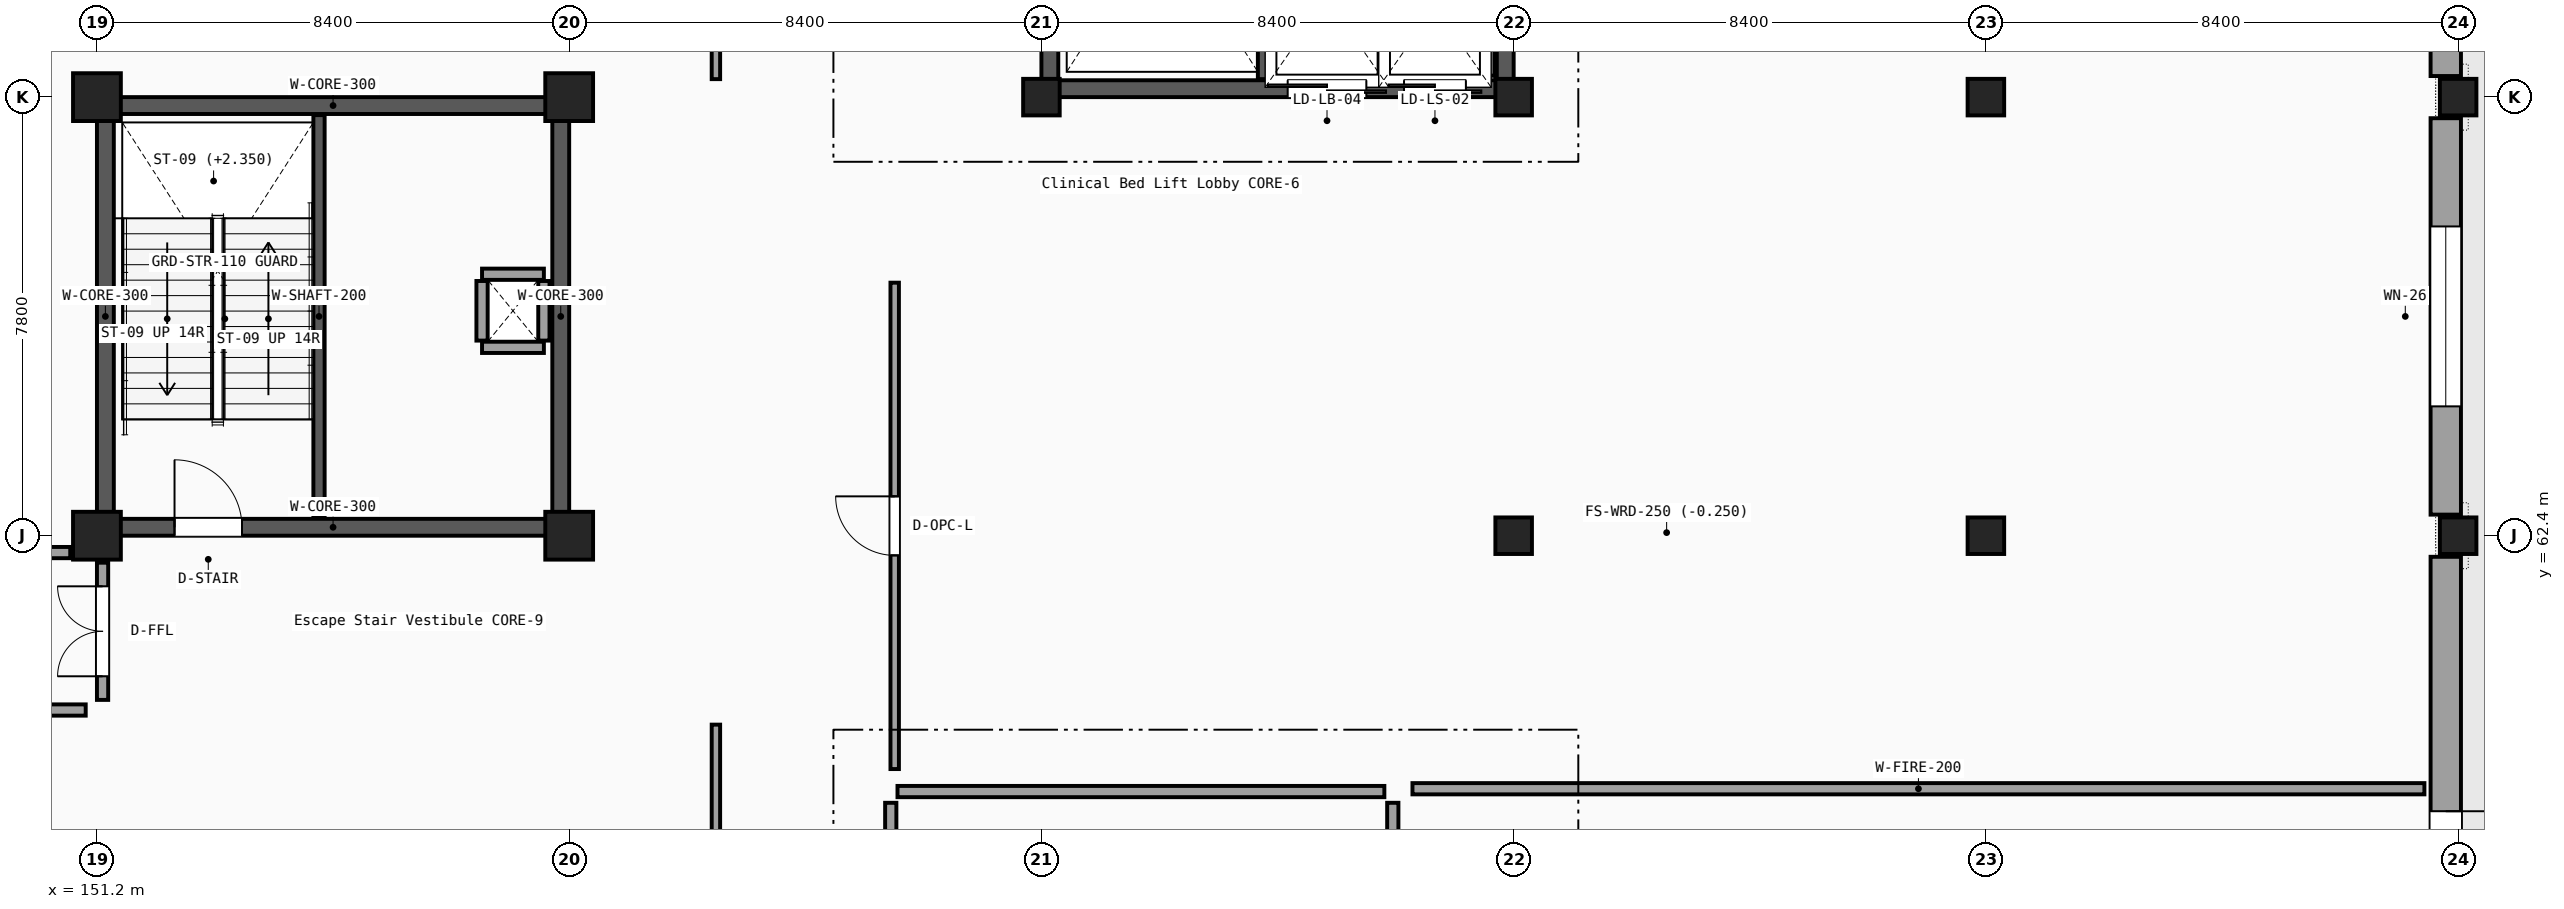
"""IFC4 building model, lengths in metres.
Left out: names, types, materials, properties, quantities, classifications, styles, units other than length and angle.
Written with IfcOpenShell. Run it as: python <this file> out.ifc"""

import sys

from ifc_helpers import new_model, si_unit, direction, frame, frame_2d, origin, origin_2d, place, context, subcontext, project, spatial, rectangle, i_section, extrude, element, fill, save


model = new_model("IFC4")
c1 = context("Model", 3, precision=1e-05, world=origin(), true_north=direction((0.0, 1.0)))
c2 = subcontext(c1, "Body", "Model", "MODEL_VIEW")
j1 = project(units=[si_unit("LENGTHUNIT", "METRE"), si_unit("PLANEANGLEUNIT", "RADIAN")], contexts=[c1])
p1 = place(None, origin())
s1 = spatial("IfcSite", under=j1, at=p1, CompositionType="ELEMENT")
p2 = place(p1, origin())
s2 = spatial("IfcBuilding", under=s1, at=p2, CompositionType="ELEMENT")
p3 = place(p2, origin())
s3 = spatial("IfcBuildingStorey", under=s2, at=p3, CompositionType="ELEMENT", Elevation=0.0)
for number, where, z_axis, x_axis in (
    (1, (151.2, 62.4, 0.0), (0.0, 0.0, 1.0), (1.0, 0.0, 0.0)),
    (2, (151.2, 70.2, 0.0), (0.0, 0.0, 1.0), (1.0, 0.0, 0.0)),
    (3, (159.6, 62.4, 0.0), (0.0, 0.0, 1.0), (1.0, 0.0, 0.0)),
    (4, (159.6, 70.2, 0.0), (0.0, 0.0, 1.0), (1.0, 0.0, 0.0)),
):
    element("IfcColumn", number, at=place(p3, frame(where, z_axis=z_axis, x_axis=x_axis)), inside=s3, PredefinedType="COLUMN", context=c2, shape_type="SweptSolid", body=[
        extrude(rectangle(XDim=0.85, YDim=0.85, at=origin_2d()), origin(), (0.0, 0.0, 1.0), 5.1),
    ])
for number, where, z_axis, x_axis in (
    (5, (168.0, 70.2, 0.0), (0.0, 0.0, 1.0), (1.0, 0.0, 0.0)),
    (6, (176.4, 62.4, 0.0), (0.0, 0.0, 1.0), (1.0, 0.0, 0.0)),
    (7, (176.4, 70.2, 0.0), (0.0, 0.0, 1.0), (1.0, 0.0, 0.0)),
    (8, (184.8, 62.4, 0.0), (0.0, 0.0, 1.0), (1.0, 0.0, 0.0)),
    (9, (184.8, 70.2, 0.0), (0.0, 0.0, 1.0), (1.0, 0.0, 0.0)),
    (10, (193.2, 62.4, 0.0), (0.0, 0.0, 1.0), (1.0, 0.0, 0.0)),
    (11, (193.2, 70.2, 0.0), (0.0, 0.0, 1.0), (1.0, 0.0, 0.0)),
):
    element("IfcColumn", number, at=place(p3, frame(where, z_axis=z_axis, x_axis=x_axis)), inside=s3, PredefinedType="COLUMN", context=c2, shape_type="SweptSolid", body=[
        extrude(i_section(OverallWidth=0.3, OverallDepth=0.65, WebThickness=0.016, FlangeThickness=0.031, FilletRadius=0.027, at=origin_2d()), origin(), (0.0, 0.0, 1.0), 5.1),
    ])
p4 = place(p3, frame((192.98, 54.975, 0.0), z_axis=(0.0, 0.0, 1.0), x_axis=(0.0, 1.0, 0.0)))
e12 = element("IfcWall", 12, at=p4, inside=s3, PredefinedType="SOLIDWALL", context=c2, shape_type="SweptSolid", body=[
    extrude(rectangle(XDim=7.05, YDim=0.54, at=frame_2d((3.525, 0.0))), origin(), (0.0, 0.0, 1.0), 4.33),
])
p5 = place(p4, frame((0.525, 0.0, 0.0)))
e13 = element("IfcOpeningElement", 13, at=p5, cuts=e12, PredefinedType="OPENING", context=c2, shape_type="SweptSolid", body=[
    extrude(rectangle(XDim=2.0, YDim=2.25, at=frame_2d((1.0, 1.125))), frame((0.0, 0.28, 0.0), z_axis=(0.0, -1.0, 0.0), x_axis=(1.0, 0.0, 0.0)), (0.0, 0.0, 1.0), 0.56),
])
p6 = place(p3, frame((192.98, 62.775, 0.0), z_axis=(0.0, 0.0, 1.0), x_axis=(0.0, 1.0, 0.0)))
e14 = element("IfcWall", 14, at=p6, inside=s3, PredefinedType="SOLIDWALL", context=c2, shape_type="SweptSolid", body=[
    extrude(rectangle(XDim=7.05, YDim=0.54, at=frame_2d((3.525, 0.0))), origin(), (0.0, 0.0, 1.0), 4.33),
])
p7 = place(p6, frame((1.925, 0.0, 0.75)))
e15 = element("IfcOpeningElement", 15, at=p7, cuts=e14, PredefinedType="OPENING", context=c2, shape_type="SweptSolid", body=[
    extrude(rectangle(XDim=3.2, YDim=1.8, at=frame_2d((1.6, 0.9))), frame((0.0, 0.28, 0.0), z_axis=(0.0, -1.0, 0.0), x_axis=(1.0, 0.0, 0.0)), (0.0, 0.0, 1.0), 0.56),
])
p8 = place(p3, frame((192.98, 70.575, 0.0), z_axis=(0.0, 0.0, 1.0), x_axis=(0.0, 1.0, 0.0)))
e16 = element("IfcWall", 16, at=p8, inside=s3, PredefinedType="SOLIDWALL", context=c2, shape_type="SweptSolid", body=[
    extrude(rectangle(XDim=7.05, YDim=0.54, at=frame_2d((3.525, 0.0))), origin(), (0.0, 0.0, 1.0), 4.33),
])
p9 = place(p8, frame((2.425, 0.0, 0.0)))
e17 = element("IfcOpeningElement", 17, at=p9, cuts=e16, PredefinedType="OPENING", context=c2, shape_type="SweptSolid", body=[
    extrude(rectangle(XDim=2.2, YDim=2.3, at=frame_2d((1.1, 1.15))), frame((0.0, 0.28, 0.0), z_axis=(0.0, -1.0, 0.0), x_axis=(1.0, 0.0, 0.0)), (0.0, 0.0, 1.0), 0.56),
])
p10 = place(p3, frame((165.44, 57.85, 0.0), z_axis=(0.0, 0.0, 1.0), x_axis=(1.0, 0.0, 0.0)))
e18 = element("IfcWall", 18, at=p10, inside=s3, PredefinedType="PARTITIONING", context=c2, shape_type="SweptSolid", body=[
    extrude(rectangle(XDim=8.66, YDim=0.2, at=frame_2d((4.33, 0.0))), origin(), (0.0, 0.0, 1.0), 4.33),
])
p11 = place(p3, frame((165.32, 55.0, 0.0), z_axis=(0.0, 0.0, 1.0), x_axis=(0.0, 1.0, 0.0)))
e19 = element("IfcWall", 19, at=p11, inside=s3, PredefinedType="PARTITIONING", context=c2, shape_type="SweptSolid", body=[
    extrude(rectangle(XDim=2.65, YDim=0.2, at=frame_2d((1.325, 0.0))), origin(), (0.0, 0.0, 1.0), 4.33),
])
p12 = place(p11, frame((0.525, 0.0, 0.0)))
e20 = element("IfcOpeningElement", 20, at=p12, cuts=e19, PredefinedType="OPENING", context=c2, shape_type="SweptSolid", body=[
    extrude(rectangle(XDim=1.6, YDim=2.2, at=frame_2d((0.8, 1.1))), frame((0.0, 0.11, 0.0), z_axis=(0.0, -1.0, 0.0), x_axis=(1.0, 0.0, 0.0)), (0.0, 0.0, 1.0), 0.22),
])
p13 = place(p3, frame((174.25, 55.0, 0.0), z_axis=(0.0, 0.0, 1.0), x_axis=(0.0, 1.0, 0.0)))
e21 = element("IfcWall", 21, at=p13, inside=s3, PredefinedType="PARTITIONING", context=c2, shape_type="SweptSolid", body=[
    extrude(rectangle(XDim=2.65, YDim=0.2, at=frame_2d((1.325, 0.0))), origin(), (0.0, 0.0, 1.0), 4.33),
])
p14 = place(p13, frame((0.525, 0.0, 0.0)))
e22 = element("IfcOpeningElement", 22, at=p14, cuts=e21, PredefinedType="OPENING", context=c2, shape_type="SweptSolid", body=[
    extrude(rectangle(XDim=1.6, YDim=2.2, at=frame_2d((0.8, 1.1))), frame((0.0, 0.11, 0.0), z_axis=(0.0, -1.0, 0.0), x_axis=(1.0, 0.0, 0.0)), (0.0, 0.0, 1.0), 0.22),
])
p15 = place(p3, frame((168.0, 70.35, 0.0), z_axis=(0.0, 0.0, 1.0), x_axis=(1.0, 0.0, 0.0)))
e23 = element("IfcWall", 23, at=p15, inside=s3, PredefinedType="SHEAR", context=c2, shape_type="SweptSolid", body=[
    extrude(rectangle(XDim=8.4, YDim=0.3, at=frame_2d((4.2, 0.0))), origin(), (0.0, 0.0, 1.0), 4.85),
])
p16 = place(p15, frame((4.38, 0.0, 0.0)))
e24 = element("IfcOpeningElement", 24, at=p16, cuts=e23, PredefinedType="OPENING", context=c2, shape_type="SweptSolid", body=[
    extrude(rectangle(XDim=1.4, YDim=2.2, at=frame_2d((0.7, 1.1))), frame((0.0, 0.16, 0.0), z_axis=(0.0, -1.0, 0.0), x_axis=(1.0, 0.0, 0.0)), (0.0, 0.0, 1.0), 0.32),
])
p17 = place(p15, frame((6.45, 0.0, 0.0)))
e25 = element("IfcOpeningElement", 25, at=p17, cuts=e23, PredefinedType="OPENING", context=c2, shape_type="SweptSolid", body=[
    extrude(rectangle(XDim=1.1, YDim=2.15, at=frame_2d((0.55, 1.075))), frame((0.0, 0.16, 0.0), z_axis=(0.0, -1.0, 0.0), x_axis=(1.0, 0.0, 0.0)), (0.0, 0.0, 1.0), 0.32),
])
for number, where, z_axis, x_axis in (
    (26, (168.15, 70.5, 0.0), (0.0, 0.0, 1.0), (0.0, 1.0, 0.0)),
    (27, (176.25, 70.5, 0.0), (0.0, 0.0, 1.0), (0.0, 1.0, 0.0)),
):
    element("IfcWall", number, at=place(p3, frame(where, z_axis=z_axis, x_axis=x_axis)), inside=s3, PredefinedType="SHEAR", context=c2, shape_type="SweptSolid", body=[
        extrude(rectangle(XDim=7.2, YDim=0.3, at=frame_2d((3.6, 0.0))), origin(), (0.0, 0.0, 1.0), 4.85),
    ])
p18 = place(p3, frame((171.95, 70.52, 0.0), z_axis=(0.0, 0.0, 1.0), x_axis=(0.0, 1.0, 0.0)))
e28 = element("IfcWall", 28, at=p18, inside=s3, PredefinedType="SHEAR", context=c2, shape_type="SweptSolid", body=[
    extrude(rectangle(XDim=7.16, YDim=0.2, at=frame_2d((3.58, 0.0))), origin(), (0.0, 0.0, 1.0), 4.85),
])
p19 = place(p3, frame((174.14, 70.58, 0.0), z_axis=(0.0, 0.0, 1.0), x_axis=(0.0, 1.0, 0.0)))
e29 = element("IfcWall", 29, at=p19, inside=s3, PredefinedType="PARTITIONING", context=c2, shape_type="SweptSolid", body=[
    extrude(rectangle(XDim=2.74, YDim=0.2, at=frame_2d((1.37, 0.0))), origin(), (0.0, 0.0, 1.0), 4.33),
])
p20 = place(p3, frame((175.96, 70.58, 0.0), z_axis=(0.0, 0.0, 1.0), x_axis=(0.0, 1.0, 0.0)))
e30 = element("IfcWall", 30, at=p20, inside=s3, PredefinedType="PARTITIONING", context=c2, shape_type="SweptSolid", body=[
    extrude(rectangle(XDim=2.44, YDim=0.2, at=frame_2d((1.22, 0.0))), origin(), (0.0, 0.0, 1.0), 4.33),
])
p21 = place(p3, frame((151.2, 62.55, 0.0), z_axis=(0.0, 0.0, 1.0), x_axis=(1.0, 0.0, 0.0)))
e31 = element("IfcWall", 31, at=p21, inside=s3, PredefinedType="SHEAR", context=c2, shape_type="SweptSolid", body=[
    extrude(rectangle(XDim=8.4, YDim=0.3, at=frame_2d((4.2, 0.0))), origin(), (0.0, 0.0, 1.0), 4.85),
])
p22 = place(p21, frame((1.38, 0.0, 0.0)))
e32 = element("IfcOpeningElement", 32, at=p22, cuts=e31, PredefinedType="OPENING", context=c2, shape_type="SweptSolid", body=[
    extrude(rectangle(XDim=1.2, YDim=2.15, at=frame_2d((0.6, 1.075))), frame((0.0, 0.16, 0.0), z_axis=(0.0, -1.0, 0.0), x_axis=(1.0, 0.0, 0.0)), (0.0, 0.0, 1.0), 0.32),
])
p23 = place(p3, frame((151.2, 70.05, 0.0), z_axis=(0.0, 0.0, 1.0), x_axis=(1.0, 0.0, 0.0)))
e33 = element("IfcWall", 33, at=p23, inside=s3, PredefinedType="SHEAR", context=c2, shape_type="SweptSolid", body=[
    extrude(rectangle(XDim=8.4, YDim=0.3, at=frame_2d((4.2, 0.0))), origin(), (0.0, 0.0, 1.0), 4.85),
])
for number, where, z_axis, x_axis in (
    (34, (151.35, 62.7, 0.0), (0.0, 0.0, 1.0), (0.0, 1.0, 0.0)),
    (35, (159.45, 62.7, 0.0), (0.0, 0.0, 1.0), (0.0, 1.0, 0.0)),
):
    element("IfcWall", number, at=place(p3, frame(where, z_axis=z_axis, x_axis=x_axis)), inside=s3, PredefinedType="SHEAR", context=c2, shape_type="SweptSolid", body=[
        extrude(rectangle(XDim=7.2, YDim=0.3, at=frame_2d((3.6, 0.0))), origin(), (0.0, 0.0, 1.0), 4.85),
    ])
p24 = place(p3, frame((155.15, 62.72, 0.0), z_axis=(0.0, 0.0, 1.0), x_axis=(0.0, 1.0, 0.0)))
e36 = element("IfcWall", 36, at=p24, inside=s3, PredefinedType="SHEAR", context=c2, shape_type="SweptSolid", body=[
    extrude(rectangle(XDim=7.16, YDim=0.2, at=frame_2d((3.58, 0.0))), origin(), (0.0, 0.0, 1.0), 4.85),
])
for number, where, z_axis, x_axis in (
    (37, (158.05, 65.75, 0.0), (0.0, 0.0, 1.0), (1.0, 0.0, 0.0)),
    (38, (158.05, 67.05, 0.0), (0.0, 0.0, 1.0), (1.0, 0.0, 0.0)),
):
    element("IfcWall", number, at=place(p3, frame(where, z_axis=z_axis, x_axis=x_axis)), inside=s3, PredefinedType="PARTITIONING", context=c2, shape_type="SweptSolid", body=[
        extrude(rectangle(XDim=1.1, YDim=0.2, at=frame_2d((0.55, 0.0))), origin(), (0.0, 0.0, 1.0), 4.33),
    ])
for number, where, z_axis, x_axis in (
    (39, (158.05, 65.87, 0.0), (0.0, 0.0, 1.0), (0.0, 1.0, 0.0)),
    (40, (159.15, 65.87, 0.0), (0.0, 0.0, 1.0), (0.0, 1.0, 0.0)),
):
    element("IfcWall", number, at=place(p3, frame(where, z_axis=z_axis, x_axis=x_axis)), inside=s3, PredefinedType="PARTITIONING", context=c2, shape_type="SweptSolid", body=[
        extrude(rectangle(XDim=1.06, YDim=0.2, at=frame_2d((0.53, 0.0))), origin(), (0.0, 0.0, 1.0), 4.33),
    ])
p25 = place(p3, frame((174.6, 57.9, 0.0), z_axis=(0.0, 0.0, 1.0), x_axis=(1.0, 0.0, 0.0)))
e41 = element("IfcWall", 41, at=p25, inside=s3, PredefinedType="PARTITIONING", context=c2, shape_type="SweptSolid", body=[
    extrude(rectangle(XDim=18.0, YDim=0.2, at=frame_2d((9.0, 0.0))), origin(), (0.0, 0.0, 1.0), 4.38),
])
p26 = place(p3, frame((126.7, 59.3, 0.0), z_axis=(0.0, 0.0, 1.0), x_axis=(1.0, 0.0, 0.0)))
e42 = element("IfcWall", 42, at=p26, inside=s3, PredefinedType="PARTITIONING", context=c2, shape_type="SweptSolid", body=[
    extrude(rectangle(XDim=24.3, YDim=0.2, at=frame_2d((12.15, 0.0))), origin(), (0.0, 0.0, 1.0), 4.38),
])
p27 = place(p3, frame((143.275, 62.1, 0.0), z_axis=(0.0, 0.0, 1.0), x_axis=(1.0, 0.0, 0.0)))
e43 = element("IfcWall", 43, at=p27, inside=s3, PredefinedType="PARTITIONING", context=c2, shape_type="SweptSolid", body=[
    extrude(rectangle(XDim=7.45, YDim=0.2, at=frame_2d((3.725, 0.0))), origin(), (0.0, 0.0, 1.0), 4.33),
])
p28 = place(p3, frame((151.3, 59.48, 0.0), z_axis=(0.0, 0.0, 1.0), x_axis=(0.0, 1.0, 0.0)))
e44 = element("IfcWall", 44, at=p28, inside=s3, PredefinedType="PARTITIONING", context=c2, shape_type="SweptSolid", body=[
    extrude(rectangle(XDim=2.44, YDim=0.2, at=frame_2d((1.22, 0.0))), origin(), (0.0, 0.0, 1.0), 4.38),
])
p29 = place(p28, frame((0.42, 0.0, 0.0)))
e45 = element("IfcOpeningElement", 45, at=p29, cuts=e44, PredefinedType="OPENING", context=c2, shape_type="SweptSolid", body=[
    extrude(rectangle(XDim=1.6, YDim=2.2, at=frame_2d((0.8, 1.1))), frame((0.0, 0.11, 0.0), z_axis=(0.0, -1.0, 0.0), x_axis=(1.0, 0.0, 0.0)), (0.0, 0.0, 1.0), 0.22),
])
p30 = place(p3, frame((162.21, 47.42, 0.0), z_axis=(0.0, 0.0, 1.0), x_axis=(0.0, 1.0, 0.0)))
e46 = element("IfcWall", 46, at=p30, inside=s3, PredefinedType="PARTITIONING", context=c2, shape_type="SweptSolid", body=[
    extrude(rectangle(XDim=11.62, YDim=0.15, at=frame_2d((5.81, 0.0))), origin(), (0.0, 0.0, 1.0), 4.33),
])
p31 = place(p30, frame((5.285, 0.0, 0.0)))
e47 = element("IfcOpeningElement", 47, at=p31, cuts=e46, PredefinedType="OPENING", context=c2, shape_type="SweptSolid", body=[
    extrude(rectangle(XDim=1.05, YDim=2.15, at=frame_2d((0.525, 1.075))), frame((0.0, 0.085, 0.0), z_axis=(0.0, -1.0, 0.0), x_axis=(1.0, 0.0, 0.0)), (0.0, 0.0, 1.0), 0.17),
])
p32 = place(p3, frame((162.21, 70.52, 0.0), z_axis=(0.0, 0.0, 1.0), x_axis=(0.0, 1.0, 0.0)))
e48 = element("IfcWall", 48, at=p32, inside=s3, PredefinedType="PARTITIONING", context=c2, shape_type="SweptSolid", body=[
    extrude(rectangle(XDim=11.07, YDim=0.15, at=frame_2d((5.535, 0.0))), origin(), (0.0, 0.0, 1.0), 4.33),
])
p33 = place(p32, frame((5.01, 0.0, 0.0)))
e49 = element("IfcOpeningElement", 49, at=p33, cuts=e48, PredefinedType="OPENING", context=c2, shape_type="SweptSolid", body=[
    extrude(rectangle(XDim=1.05, YDim=2.15, at=frame_2d((0.525, 1.075))), frame((0.0, 0.085, 0.0), z_axis=(0.0, -1.0, 0.0), x_axis=(1.0, 0.0, 0.0)), (0.0, 0.0, 1.0), 0.17),
])
p34 = place(p3, frame((165.39, 58.25, 0.0), z_axis=(0.0, 0.0, 1.0), x_axis=(0.0, 1.0, 0.0)))
e50 = element("IfcWall", 50, at=p34, inside=s3, PredefinedType="PARTITIONING", context=c2, shape_type="SweptSolid", body=[
    extrude(rectangle(XDim=8.65, YDim=0.15, at=frame_2d((4.325, 0.0))), origin(), (0.0, 0.0, 1.0), 4.33),
])
p35 = place(p34, frame((3.8, 0.0, 0.0)))
e51 = element("IfcOpeningElement", 51, at=p35, cuts=e50, PredefinedType="OPENING", context=c2, shape_type="SweptSolid", body=[
    extrude(rectangle(XDim=1.05, YDim=2.15, at=frame_2d((0.525, 1.075))), frame((0.0, 0.085, 0.0), z_axis=(0.0, -1.0, 0.0), x_axis=(1.0, 0.0, 0.0)), (0.0, 0.0, 1.0), 0.17),
])
p36 = place(p5, frame((2.0, 0.0, 0.0), z_axis=(0.0, 0.0, 1.0), x_axis=(-1.0, 0.0, 0.0)))
e52 = element("IfcDoor", 52, at=p36, inside=s3, OperationType="DOUBLE_DOOR_SINGLE_SWING", PredefinedType="DOOR", context=c2, shape_type="SweptSolid", body=[
    extrude(rectangle(XDim=2.0, YDim=2.25, at=frame_2d((1.0, 1.125))), frame((0.0, 0.025, 0.0), z_axis=(0.0, -1.0, 0.0), x_axis=(1.0, 0.0, 0.0)), (0.0, 0.0, 1.0), 0.05),
])
fill(e13, e52)
p37 = place(p7, origin())
e53 = element("IfcWindow", 53, at=p37, inside=s3, PartitioningType="SINGLE_PANEL", PredefinedType="WINDOW", context=c2, shape_type="SweptSolid", body=[
    extrude(rectangle(XDim=3.2, YDim=1.8, at=frame_2d((1.6, 0.9))), frame((0.0, 0.03, 0.0), z_axis=(0.0, -1.0, 0.0), x_axis=(1.0, 0.0, 0.0)), (0.0, 0.0, 1.0), 0.06),
])
fill(e15, e53)
p38 = place(p16, origin())
e54 = element("IfcDoor", 54, at=p38, inside=s3, OperationType="DOUBLE_DOOR_SLIDING", PredefinedType="DOOR", context=c2, shape_type="SweptSolid", body=[
    extrude(rectangle(XDim=1.4, YDim=2.2, at=frame_2d((0.7, 1.1))), frame((0.0, 0.025, 0.0), z_axis=(0.0, -1.0, 0.0), x_axis=(1.0, 0.0, 0.0)), (0.0, 0.0, 1.0), 0.05),
])
fill(e24, e54)
p39 = place(p17, origin())
e55 = element("IfcDoor", 55, at=p39, inside=s3, OperationType="DOUBLE_DOOR_SLIDING", PredefinedType="DOOR", context=c2, shape_type="SweptSolid", body=[
    extrude(rectangle(XDim=1.1, YDim=2.15, at=frame_2d((0.55, 1.075))), frame((0.0, 0.025, 0.0), z_axis=(0.0, -1.0, 0.0), x_axis=(1.0, 0.0, 0.0)), (0.0, 0.0, 1.0), 0.05),
])
fill(e25, e55)
p40 = place(p22, origin())
e56 = element("IfcDoor", 56, at=p40, inside=s3, OperationType="SINGLE_SWING_LEFT", PredefinedType="DOOR", context=c2, shape_type="SweptSolid", body=[
    extrude(rectangle(XDim=1.2, YDim=2.15, at=frame_2d((0.6, 1.075))), frame((0.0, 0.025, 0.0), z_axis=(0.0, -1.0, 0.0), x_axis=(1.0, 0.0, 0.0)), (0.0, 0.0, 1.0), 0.05),
])
fill(e32, e56)
p41 = place(p29, origin())
e57 = element("IfcDoor", 57, at=p41, inside=s3, OperationType="DOUBLE_DOOR_SINGLE_SWING", PredefinedType="DOOR", context=c2, shape_type="SweptSolid", body=[
    extrude(rectangle(XDim=1.6, YDim=2.2, at=frame_2d((0.8, 1.1))), frame((0.0, 0.025, 0.0), z_axis=(0.0, -1.0, 0.0), x_axis=(1.0, 0.0, 0.0)), (0.0, 0.0, 1.0), 0.05),
])
fill(e45, e57)
p42 = place(p35, origin())
e58 = element("IfcDoor", 58, at=p42, inside=s3, OperationType="SINGLE_SWING_RIGHT", PredefinedType="DOOR", context=c2, shape_type="SweptSolid", body=[
    extrude(rectangle(XDim=1.05, YDim=2.15, at=frame_2d((0.525, 1.075))), frame((0.0, 0.025, 0.0), z_axis=(0.0, -1.0, 0.0), x_axis=(1.0, 0.0, 0.0)), (0.0, 0.0, 1.0), 0.05),
])
fill(e51, e58)
save(model, sys.argv[1])
